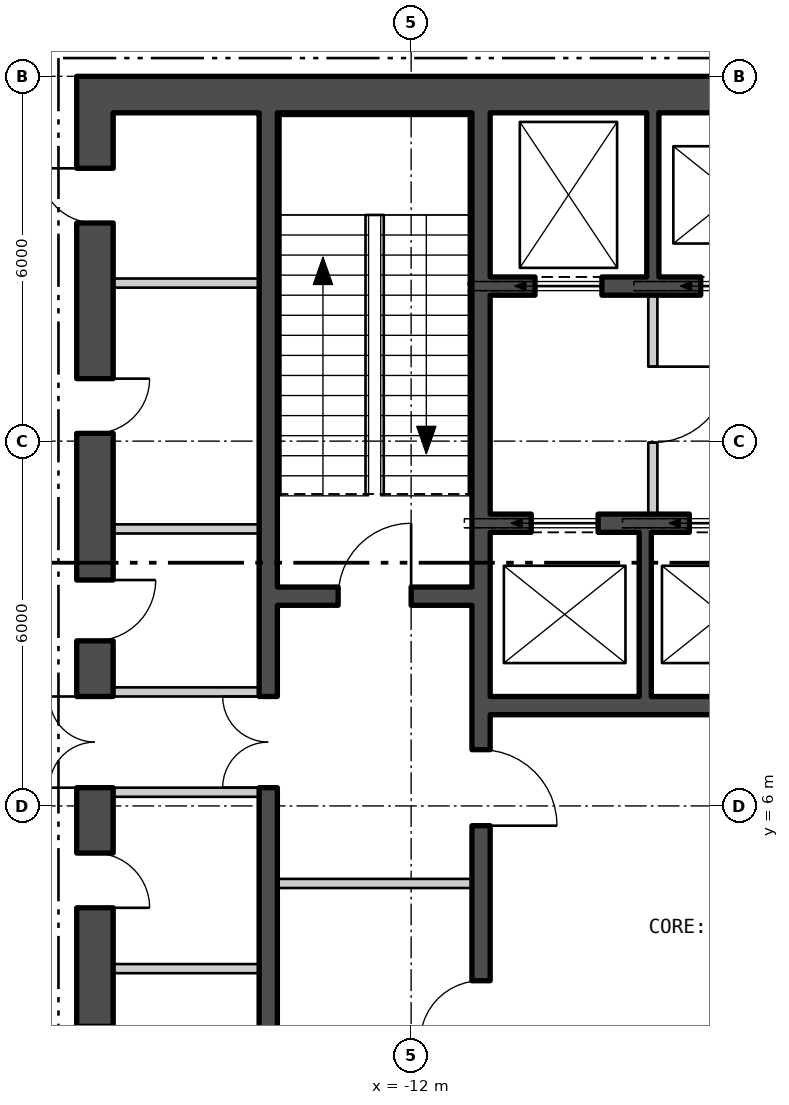
"""IFC4 building model, lengths in metres.
Left out: names, types, materials, properties, quantities, classifications, styles, units other than length and angle.
Written with IfcOpenShell. Run it as: python <this file> out.ifc"""

import sys

from ifc_helpers import new_model, si_unit, direction, frame, frame_2d, origin, place, context, subcontext, project, spatial, polyline, rectangle, outline, extrude, element, fill, save


model = new_model("IFC4")
c1 = context("Model", 3, precision=1e-05, world=origin(), true_north=direction((0.0, 1.0)))
c2 = subcontext(c1, "Body", "Model", "MODEL_VIEW")
j1 = project(units=[si_unit("LENGTHUNIT", "METRE"), si_unit("PLANEANGLEUNIT", "RADIAN")], contexts=[c1])
p1 = place(None, origin())
s1 = spatial("IfcSite", under=j1, at=p1, CompositionType="ELEMENT")
p2 = place(p1, origin())
s2 = spatial("IfcBuilding", under=s1, at=p2, CompositionType="ELEMENT")
p3 = place(p2, frame((0.0, 0.0, 33.3)))
s3 = spatial("IfcBuildingStorey", under=s2, at=p3, CompositionType="ELEMENT", Elevation=33.3)
p4 = place(p3, frame((-28.625, 10.015, -0.18), z_axis=(0.0, 0.0, 1.0), x_axis=(0.500000335318, -0.866025210188, 0.0)))
e1 = element("IfcWall", 1, at=p4, inside=s3, PredefinedType="SOLIDWALL", context=c2, shape_type="SweptSolid", body=[
    extrude(outline(polyline([(-0.13, -0.225), (45.88, -0.225), (45.62, 0.225), (0.13, 0.225), (-0.13, -0.225)])), origin(), (0.0, 0.0, 1.0), 4.28),
])
p5 = place(p4, frame((1.425, 0.0, 1.08)))
e2 = element("IfcOpeningElement", 2, at=p5, cuts=e1, PredefinedType="OPENING", context=c2, shape_type="SweptSolid", body=[
    extrude(rectangle(XDim=2.4, YDim=2.6, at=frame_2d((1.2, 1.3))), frame((0.0, 0.235, 0.0), z_axis=(0.0, -1.0, 0.0), x_axis=(1.0, 0.0, 0.0)), (0.0, 0.0, 1.0), 0.47),
])
p6 = place(p4, frame((5.895, 0.0, 1.08)))
e3 = element("IfcOpeningElement", 3, at=p6, cuts=e1, PredefinedType="OPENING", context=c2, shape_type="SweptSolid", body=[
    extrude(rectangle(XDim=2.4, YDim=2.6, at=frame_2d((1.2, 1.3))), frame((0.0, 0.235, 0.0), z_axis=(0.0, -1.0, 0.0), x_axis=(1.0, 0.0, 0.0)), (0.0, 0.0, 1.0), 0.47),
])
p7 = place(p4, frame((10.403, 0.0, 1.08)))
e4 = element("IfcOpeningElement", 4, at=p7, cuts=e1, PredefinedType="OPENING", context=c2, shape_type="SweptSolid", body=[
    extrude(rectangle(XDim=2.4, YDim=2.6, at=frame_2d((1.2, 1.3))), frame((0.0, 0.235, 0.0), z_axis=(0.0, -1.0, 0.0), x_axis=(1.0, 0.0, 0.0)), (0.0, 0.0, 1.0), 0.47),
])
p8 = place(p4, frame((14.912, 0.0, 1.08)))
e5 = element("IfcOpeningElement", 5, at=p8, cuts=e1, PredefinedType="OPENING", context=c2, shape_type="SweptSolid", body=[
    extrude(rectangle(XDim=2.4, YDim=2.6, at=frame_2d((1.2, 1.3))), frame((0.0, 0.235, 0.0), z_axis=(0.0, -1.0, 0.0), x_axis=(1.0, 0.0, 0.0)), (0.0, 0.0, 1.0), 0.47),
])
p9 = place(p4, frame((19.421, 0.0, 1.08)))
e6 = element("IfcOpeningElement", 6, at=p9, cuts=e1, PredefinedType="OPENING", context=c2, shape_type="SweptSolid", body=[
    extrude(rectangle(XDim=2.4, YDim=2.6, at=frame_2d((1.2, 1.3))), frame((0.0, 0.235, 0.0), z_axis=(0.0, -1.0, 0.0), x_axis=(1.0, 0.0, 0.0)), (0.0, 0.0, 1.0), 0.47),
])
p10 = place(p4, frame((23.929, 0.0, 1.08)))
e7 = element("IfcOpeningElement", 7, at=p10, cuts=e1, PredefinedType="OPENING", context=c2, shape_type="SweptSolid", body=[
    extrude(rectangle(XDim=2.4, YDim=2.6, at=frame_2d((1.2, 1.3))), frame((0.0, 0.235, 0.0), z_axis=(0.0, -1.0, 0.0), x_axis=(1.0, 0.0, 0.0)), (0.0, 0.0, 1.0), 0.47),
])
p11 = place(p4, frame((28.438, 0.0, 1.08)))
e8 = element("IfcOpeningElement", 8, at=p11, cuts=e1, PredefinedType="OPENING", context=c2, shape_type="SweptSolid", body=[
    extrude(rectangle(XDim=2.4, YDim=2.6, at=frame_2d((1.2, 1.3))), frame((0.0, 0.235, 0.0), z_axis=(0.0, -1.0, 0.0), x_axis=(1.0, 0.0, 0.0)), (0.0, 0.0, 1.0), 0.47),
])
p12 = place(p4, frame((32.947, 0.0, 1.08)))
e9 = element("IfcOpeningElement", 9, at=p12, cuts=e1, PredefinedType="OPENING", context=c2, shape_type="SweptSolid", body=[
    extrude(rectangle(XDim=2.4, YDim=2.6, at=frame_2d((1.2, 1.3))), frame((0.0, 0.235, 0.0), z_axis=(0.0, -1.0, 0.0), x_axis=(1.0, 0.0, 0.0)), (0.0, 0.0, 1.0), 0.47),
])
p13 = place(p4, frame((37.455, 0.0, 1.08)))
e10 = element("IfcOpeningElement", 10, at=p13, cuts=e1, PredefinedType="OPENING", context=c2, shape_type="SweptSolid", body=[
    extrude(rectangle(XDim=2.4, YDim=2.6, at=frame_2d((1.2, 1.3))), frame((0.0, 0.235, 0.0), z_axis=(0.0, -1.0, 0.0), x_axis=(1.0, 0.0, 0.0)), (0.0, 0.0, 1.0), 0.47),
])
p14 = place(p4, frame((41.925, 0.0, 1.08)))
e11 = element("IfcOpeningElement", 11, at=p14, cuts=e1, PredefinedType="OPENING", context=c2, shape_type="SweptSolid", body=[
    extrude(rectangle(XDim=2.4, YDim=2.6, at=frame_2d((1.2, 1.3))), frame((0.0, 0.235, 0.0), z_axis=(0.0, -1.0, 0.0), x_axis=(1.0, 0.0, 0.0)), (0.0, 0.0, 1.0), 0.47),
])
p15 = place(p3, frame((-17.5, 17.7, 0.0), z_axis=(0.0, 0.0, 1.0), x_axis=(1.0, 0.0, 0.0)))
e12 = element("IfcWall", 12, at=p15, inside=s3, PredefinedType="SHEAR", context=c2, shape_type="SweptSolid", body=[
    extrude(rectangle(XDim=35.0, YDim=0.6, at=frame_2d((17.5, 0.0))), origin(), (0.0, 0.0, 1.0), 4.3),
])
p16 = place(p3, frame((-17.2, 0.6, 0.0), z_axis=(0.0, 0.0, 1.0), x_axis=(0.0, 1.0, 0.0)))
e13 = element("IfcWall", 13, at=p16, inside=s3, PredefinedType="SHEAR", context=c2, shape_type="SweptSolid", body=[
    extrude(rectangle(XDim=16.8, YDim=0.6, at=frame_2d((8.4, 0.0))), origin(), (0.0, 0.0, 1.0), 4.3),
])
p17 = place(p16, frame((5.7, 0.0, 0.0)))
e14 = element("IfcOpeningElement", 14, at=p17, cuts=e13, PredefinedType="OPENING", context=c2, shape_type="SweptSolid", body=[
    extrude(rectangle(XDim=1.5, YDim=2.1, at=frame_2d((0.75, 1.05))), frame((0.0, 0.31, 0.0), z_axis=(0.0, -1.0, 0.0), x_axis=(1.0, 0.0, 0.0)), (0.0, 0.0, 1.0), 0.62),
])
p18 = place(p16, frame((0.875, 0.0, 0.0)))
e15 = element("IfcOpeningElement", 15, at=p18, cuts=e13, PredefinedType="OPENING", context=c2, shape_type="SweptSolid", body=[
    extrude(rectangle(XDim=0.9, YDim=2.1, at=frame_2d((0.45, 1.05))), frame((0.0, 0.31, 0.0), z_axis=(0.0, -1.0, 0.0), x_axis=(1.0, 0.0, 0.0)), (0.0, 0.0, 1.0), 0.62),
])
p19 = place(p16, frame((3.724, 0.0, 0.0)))
e16 = element("IfcOpeningElement", 16, at=p19, cuts=e13, PredefinedType="OPENING", context=c2, shape_type="SweptSolid", body=[
    extrude(rectangle(XDim=0.9, YDim=2.1, at=frame_2d((0.45, 1.05))), frame((0.0, 0.31, 0.0), z_axis=(0.0, -1.0, 0.0), x_axis=(1.0, 0.0, 0.0)), (0.0, 0.0, 1.0), 0.62),
])
p20 = place(p16, frame((8.115, 0.0, 0.0)))
e17 = element("IfcOpeningElement", 17, at=p20, cuts=e13, PredefinedType="OPENING", context=c2, shape_type="SweptSolid", body=[
    extrude(rectangle(XDim=1.0, YDim=2.1, at=frame_2d((0.5, 1.05))), frame((0.0, 0.31, 0.0), z_axis=(0.0, -1.0, 0.0), x_axis=(1.0, 0.0, 0.0)), (0.0, 0.0, 1.0), 0.62),
])
p21 = place(p16, frame((11.528, 0.0, 0.0)))
e18 = element("IfcOpeningElement", 18, at=p21, cuts=e13, PredefinedType="OPENING", context=c2, shape_type="SweptSolid", body=[
    extrude(rectangle(XDim=0.9, YDim=2.1, at=frame_2d((0.45, 1.05))), frame((0.0, 0.31, 0.0), z_axis=(0.0, -1.0, 0.0), x_axis=(1.0, 0.0, 0.0)), (0.0, 0.0, 1.0), 0.62),
])
p22 = place(p16, frame((14.987, 0.0, 0.0)))
e19 = element("IfcOpeningElement", 19, at=p22, cuts=e13, PredefinedType="OPENING", context=c2, shape_type="SweptSolid", body=[
    extrude(rectangle(XDim=0.9, YDim=2.1, at=frame_2d((0.45, 1.05))), frame((0.0, 0.31, 0.0), z_axis=(0.0, -1.0, 0.0), x_axis=(1.0, 0.0, 0.0)), (0.0, 0.0, 1.0), 0.62),
])
p23 = place(p3, frame((-10.85, 0.6, 0.0), z_axis=(0.0, 0.0, 1.0), x_axis=(0.0, 1.0, 0.0)))
e20 = element("IfcWall", 20, at=p23, inside=s3, PredefinedType="SHEAR", context=c2, shape_type="SweptSolid", body=[
    extrude(rectangle(XDim=16.8, YDim=0.3, at=frame_2d((8.4, 0.0))), origin(), (0.0, 0.0, 1.0), 4.3),
])
p24 = place(p23, frame((5.075, 0.0, 0.0)))
e21 = element("IfcOpeningElement", 21, at=p24, cuts=e20, PredefinedType="OPENING", context=c2, shape_type="SweptSolid", body=[
    extrude(rectangle(XDim=1.25, YDim=2.1, at=frame_2d((0.625, 1.05))), frame((0.0, 0.16, 0.0), z_axis=(0.0, -1.0, 0.0), x_axis=(1.0, 0.0, 0.0)), (0.0, 0.0, 1.0), 0.32),
])
p25 = place(p23, frame((1.525, 0.0, 0.0)))
e22 = element("IfcOpeningElement", 22, at=p25, cuts=e20, PredefinedType="OPENING", context=c2, shape_type="SweptSolid", body=[
    extrude(rectangle(XDim=1.0, YDim=2.1, at=frame_2d((0.5, 1.05))), frame((0.0, 0.16, 0.0), z_axis=(0.0, -1.0, 0.0), x_axis=(1.0, 0.0, 0.0)), (0.0, 0.0, 1.0), 0.32),
])
p26 = place(p3, frame((-14.35, 0.6, 0.0), z_axis=(0.0, 0.0, 1.0), x_axis=(0.0, 1.0, 0.0)))
e23 = element("IfcWall", 23, at=p26, inside=s3, PredefinedType="SHEAR", context=c2, shape_type="SweptSolid", body=[
    extrude(rectangle(XDim=16.8, YDim=0.3, at=frame_2d((8.4, 0.0))), origin(), (0.0, 0.0, 1.0), 4.3),
])
p27 = place(p26, frame((5.7, 0.0, 0.0)))
e24 = element("IfcOpeningElement", 24, at=p27, cuts=e23, PredefinedType="OPENING", context=c2, shape_type="SweptSolid", body=[
    extrude(rectangle(XDim=1.5, YDim=2.1, at=frame_2d((0.75, 1.05))), frame((0.0, 0.16, 0.0), z_axis=(0.0, -1.0, 0.0), x_axis=(1.0, 0.0, 0.0)), (0.0, 0.0, 1.0), 0.32),
])
p28 = place(p3, frame((-14.2, 9.45, 0.0), z_axis=(0.0, 0.0, 1.0), x_axis=(1.0, 0.0, 0.0)))
e25 = element("IfcWall", 25, at=p28, inside=s3, PredefinedType="SHEAR", context=c2, shape_type="SweptSolid", body=[
    extrude(rectangle(XDim=3.2, YDim=0.3, at=frame_2d((1.6, 0.0))), origin(), (0.0, 0.0, 1.0), 4.3),
])
p29 = place(p28, frame((1.0, 0.0, 0.0)))
e26 = element("IfcOpeningElement", 26, at=p29, cuts=e25, PredefinedType="OPENING", context=c2, shape_type="SweptSolid", body=[
    extrude(rectangle(XDim=1.2, YDim=2.1, at=frame_2d((0.6, 1.05))), frame((0.0, 0.16, 0.0), z_axis=(0.0, -1.0, 0.0), x_axis=(1.0, 0.0, 0.0)), (0.0, 0.0, 1.0), 0.32),
])
p30 = place(p3, frame((-10.7, 14.55, 0.0), z_axis=(0.0, 0.0, 1.0), x_axis=(1.0, 0.0, 0.0)))
e27 = element("IfcWall", 27, at=p30, inside=s3, PredefinedType="SHEAR", context=c2, shape_type="SweptSolid", body=[
    extrude(rectangle(XDim=21.4, YDim=0.3, at=frame_2d((10.7, 0.0))), origin(), (0.0, 0.0, 1.0), 4.3),
])
p31 = place(p30, frame((0.738, 0.0, 0.0)))
e28 = element("IfcOpeningElement", 28, at=p31, cuts=e27, PredefinedType="OPENING", context=c2, shape_type="SweptSolid", body=[
    extrude(rectangle(XDim=1.1, YDim=2.1, at=frame_2d((0.55, 1.05))), frame((0.0, 0.16, 0.0), z_axis=(0.0, -1.0, 0.0), x_axis=(1.0, 0.0, 0.0)), (0.0, 0.0, 1.0), 0.32),
])
p32 = place(p30, frame((3.462, 0.0, 0.0)))
e29 = element("IfcOpeningElement", 29, at=p32, cuts=e27, PredefinedType="OPENING", context=c2, shape_type="SweptSolid", body=[
    extrude(rectangle(XDim=1.1, YDim=2.1, at=frame_2d((0.55, 1.05))), frame((0.0, 0.16, 0.0), z_axis=(0.0, -1.0, 0.0), x_axis=(1.0, 0.0, 0.0)), (0.0, 0.0, 1.0), 0.32),
])
p33 = place(p30, frame((6.138, 0.0, 0.0)))
e30 = element("IfcOpeningElement", 30, at=p33, cuts=e27, PredefinedType="OPENING", context=c2, shape_type="SweptSolid", body=[
    extrude(rectangle(XDim=1.1, YDim=2.1, at=frame_2d((0.55, 1.05))), frame((0.0, 0.16, 0.0), z_axis=(0.0, -1.0, 0.0), x_axis=(1.0, 0.0, 0.0)), (0.0, 0.0, 1.0), 0.32),
])
p34 = place(p30, frame((8.812, 0.0, 0.0)))
e31 = element("IfcOpeningElement", 31, at=p34, cuts=e27, PredefinedType="OPENING", context=c2, shape_type="SweptSolid", body=[
    extrude(rectangle(XDim=1.1, YDim=2.1, at=frame_2d((0.55, 1.05))), frame((0.0, 0.16, 0.0), z_axis=(0.0, -1.0, 0.0), x_axis=(1.0, 0.0, 0.0)), (0.0, 0.0, 1.0), 0.32),
])
p35 = place(p30, frame((14.162, 0.0, 0.0)))
e32 = element("IfcOpeningElement", 32, at=p35, cuts=e27, PredefinedType="OPENING", context=c2, shape_type="SweptSolid", body=[
    extrude(rectangle(XDim=1.1, YDim=2.1, at=frame_2d((0.55, 1.05))), frame((0.0, 0.16, 0.0), z_axis=(0.0, -1.0, 0.0), x_axis=(1.0, 0.0, 0.0)), (0.0, 0.0, 1.0), 0.32),
])
p36 = place(p30, frame((16.837, 0.0, 0.0)))
e33 = element("IfcOpeningElement", 33, at=p36, cuts=e27, PredefinedType="OPENING", context=c2, shape_type="SweptSolid", body=[
    extrude(rectangle(XDim=1.1, YDim=2.1, at=frame_2d((0.55, 1.05))), frame((0.0, 0.16, 0.0), z_axis=(0.0, -1.0, 0.0), x_axis=(1.0, 0.0, 0.0)), (0.0, 0.0, 1.0), 0.32),
])
p37 = place(p30, frame((19.562, 0.0, 0.0)))
e34 = element("IfcOpeningElement", 34, at=p37, cuts=e27, PredefinedType="OPENING", context=c2, shape_type="SweptSolid", body=[
    extrude(rectangle(XDim=1.1, YDim=2.1, at=frame_2d((0.55, 1.05))), frame((0.0, 0.16, 0.0), z_axis=(0.0, -1.0, 0.0), x_axis=(1.0, 0.0, 0.0)), (0.0, 0.0, 1.0), 0.32),
])
p38 = place(p3, frame((-10.7, 10.65, 0.0), z_axis=(0.0, 0.0, 1.0), x_axis=(1.0, 0.0, 0.0)))
e35 = element("IfcWall", 35, at=p38, inside=s3, PredefinedType="SHEAR", context=c2, shape_type="SweptSolid", body=[
    extrude(rectangle(XDim=10.3, YDim=0.3, at=frame_2d((5.15, 0.0))), origin(), (0.0, 0.0, 1.0), 4.3),
])
p39 = place(p38, frame((0.675, 0.0, 0.0)))
e36 = element("IfcOpeningElement", 36, at=p39, cuts=e35, PredefinedType="OPENING", context=c2, shape_type="SweptSolid", body=[
    extrude(rectangle(XDim=1.1, YDim=2.1, at=frame_2d((0.55, 1.05))), frame((0.0, 0.16, 0.0), z_axis=(0.0, -1.0, 0.0), x_axis=(1.0, 0.0, 0.0)), (0.0, 0.0, 1.0), 0.32),
])
p40 = place(p38, frame((3.275, 0.0, 0.0)))
e37 = element("IfcOpeningElement", 37, at=p40, cuts=e35, PredefinedType="OPENING", context=c2, shape_type="SweptSolid", body=[
    extrude(rectangle(XDim=1.1, YDim=2.1, at=frame_2d((0.55, 1.05))), frame((0.0, 0.16, 0.0), z_axis=(0.0, -1.0, 0.0), x_axis=(1.0, 0.0, 0.0)), (0.0, 0.0, 1.0), 0.32),
])
p41 = place(p38, frame((5.825, 0.0, 0.0)))
e38 = element("IfcOpeningElement", 38, at=p41, cuts=e35, PredefinedType="OPENING", context=c2, shape_type="SweptSolid", body=[
    extrude(rectangle(XDim=1.1, YDim=2.1, at=frame_2d((0.55, 1.05))), frame((0.0, 0.16, 0.0), z_axis=(0.0, -1.0, 0.0), x_axis=(1.0, 0.0, 0.0)), (0.0, 0.0, 1.0), 0.32),
])
p42 = place(p38, frame((8.375, 0.0, 0.0)))
e39 = element("IfcOpeningElement", 39, at=p42, cuts=e35, PredefinedType="OPENING", context=c2, shape_type="SweptSolid", body=[
    extrude(rectangle(XDim=1.1, YDim=2.1, at=frame_2d((0.55, 1.05))), frame((0.0, 0.16, 0.0), z_axis=(0.0, -1.0, 0.0), x_axis=(1.0, 0.0, 0.0)), (0.0, 0.0, 1.0), 0.32),
])
p43 = place(p3, frame((-10.7, 7.65, 0.0), z_axis=(0.0, 0.0, 1.0), x_axis=(1.0, 0.0, 0.0)))
e40 = element("IfcWall", 40, at=p43, inside=s3, PredefinedType="SHEAR", context=c2, shape_type="SweptSolid", body=[
    extrude(rectangle(XDim=10.3, YDim=0.3, at=frame_2d((5.15, 0.0))), origin(), (0.0, 0.0, 1.0), 4.3),
])
for number, where, z_axis, x_axis in (
    (41, (-8.025, 14.7, 0.0), (0.0, 0.0, 1.0), (0.0, 1.0, 0.0)),
    (42, (-8.15, 7.8, 0.0), (0.0, 0.0, 1.0), (0.0, 1.0, 0.0)),
):
    element("IfcWall", number, at=place(p3, frame(where, z_axis=z_axis, x_axis=x_axis)), inside=s3, PredefinedType="SHEAR", context=c2, shape_type="SweptSolid", body=[
        extrude(rectangle(XDim=2.7, YDim=0.2, at=frame_2d((1.35, 0.0))), origin(), (0.0, 0.0, 1.0), 4.3),
    ])
p44 = place(p3, frame((-8.025, 10.8, 0.0), z_axis=(0.0, 0.0, 1.0), x_axis=(0.0, 1.0, 0.0)))
e43 = element("IfcWall", 43, at=p44, inside=s3, PredefinedType="PARTITIONING", context=c2, shape_type="SweptSolid", body=[
    extrude(rectangle(XDim=3.6, YDim=0.15, at=frame_2d((1.8, 0.0))), origin(), (0.0, 0.0, 1.0), 4.3),
])
p45 = place(p44, frame((1.175, 0.0, 0.0)))
e44 = element("IfcOpeningElement", 44, at=p45, cuts=e43, PredefinedType="OPENING", context=c2, shape_type="SweptSolid", body=[
    extrude(rectangle(XDim=1.25, YDim=2.1, at=frame_2d((0.625, 1.05))), frame((0.0, 0.085, 0.0), z_axis=(0.0, -1.0, 0.0), x_axis=(1.0, 0.0, 0.0)), (0.0, 0.0, 1.0), 0.17),
])
p46 = place(p3, frame((-14.2, 4.725, 0.0), z_axis=(0.0, 0.0, 1.0), x_axis=(1.0, 0.0, 0.0)))
e45 = element("IfcWall", 45, at=p46, inside=s3, PredefinedType="PARTITIONING", context=c2, shape_type="SweptSolid", body=[
    extrude(rectangle(XDim=3.2, YDim=0.15, at=frame_2d((1.6, 0.0))), origin(), (0.0, 0.0, 1.0), 4.3),
])
for number, where, z_axis, x_axis in (
    (46, (-16.9, 6.225, 0.0), (0.0, 0.0, 1.0), (1.0, 0.0, 0.0)),
    (47, (-16.9, 7.875, 0.0), (0.0, 0.0, 1.0), (1.0, 0.0, 0.0)),
    (48, (-16.9, 3.324, 0.0), (0.0, 0.0, 1.0), (1.0, 0.0, 0.0)),
    (49, (-16.9, 10.556, 0.0), (0.0, 0.0, 1.0), (1.0, 0.0, 0.0)),
    (50, (-16.9, 14.6, 0.0), (0.0, 0.0, 1.0), (1.0, 0.0, 0.0)),
):
    element("IfcWall", number, at=place(p3, frame(where, z_axis=z_axis, x_axis=x_axis)), inside=s3, PredefinedType="PARTITIONING", context=c2, shape_type="SweptSolid", body=[
        extrude(rectangle(XDim=2.4, YDim=0.15, at=frame_2d((1.2, 0.0))), origin(), (0.0, 0.0, 1.0), 4.3),
    ])
p47 = place(p31, origin())
e51 = element("IfcDoor", 51, at=p47, inside=s3, OperationType="SLIDING_TO_LEFT", PredefinedType="DOOR", context=c2, shape_type="SweptSolid", body=[
    extrude(rectangle(XDim=1.1, YDim=2.1, at=frame_2d((0.55, 1.05))), frame((0.0, 0.025, 0.0), z_axis=(0.0, -1.0, 0.0), x_axis=(1.0, 0.0, 0.0)), (0.0, 0.0, 1.0), 0.05),
])
fill(e28, e51)
p48 = place(p32, origin())
e52 = element("IfcDoor", 52, at=p48, inside=s3, OperationType="SLIDING_TO_LEFT", PredefinedType="DOOR", context=c2, shape_type="SweptSolid", body=[
    extrude(rectangle(XDim=1.1, YDim=2.1, at=frame_2d((0.55, 1.05))), frame((0.0, 0.025, 0.0), z_axis=(0.0, -1.0, 0.0), x_axis=(1.0, 0.0, 0.0)), (0.0, 0.0, 1.0), 0.05),
])
fill(e29, e52)
p49 = place(p39, origin())
e53 = element("IfcDoor", 53, at=p49, inside=s3, OperationType="SLIDING_TO_LEFT", PredefinedType="DOOR", context=c2, shape_type="SweptSolid", body=[
    extrude(rectangle(XDim=1.1, YDim=2.1, at=frame_2d((0.55, 1.05))), frame((0.0, 0.025, 0.0), z_axis=(0.0, -1.0, 0.0), x_axis=(1.0, 0.0, 0.0)), (0.0, 0.0, 1.0), 0.05),
])
fill(e36, e53)
p50 = place(p40, origin())
e54 = element("IfcDoor", 54, at=p50, inside=s3, OperationType="SLIDING_TO_LEFT", PredefinedType="DOOR", context=c2, shape_type="SweptSolid", body=[
    extrude(rectangle(XDim=1.1, YDim=2.1, at=frame_2d((0.55, 1.05))), frame((0.0, 0.025, 0.0), z_axis=(0.0, -1.0, 0.0), x_axis=(1.0, 0.0, 0.0)), (0.0, 0.0, 1.0), 0.05),
])
fill(e37, e54)
p51 = place(p45, origin())
e55 = element("IfcDoor", 55, at=p51, inside=s3, OperationType="SINGLE_SWING_RIGHT", PredefinedType="DOOR", context=c2, shape_type="SweptSolid", body=[
    extrude(rectangle(XDim=1.25, YDim=2.1, at=frame_2d((0.625, 1.05))), frame((0.0, 0.025, 0.0), z_axis=(0.0, -1.0, 0.0), x_axis=(1.0, 0.0, 0.0)), (0.0, 0.0, 1.0), 0.05),
])
fill(e44, e55)
p52 = place(p29, origin())
e56 = element("IfcDoor", 56, at=p52, inside=s3, OperationType="SINGLE_SWING_LEFT", PredefinedType="DOOR", context=c2, shape_type="SweptSolid", body=[
    extrude(rectangle(XDim=1.2, YDim=2.1, at=frame_2d((0.6, 1.05))), frame((0.0, 0.025, 0.0), z_axis=(0.0, -1.0, 0.0), x_axis=(1.0, 0.0, 0.0)), (0.0, 0.0, 1.0), 0.05),
])
fill(e26, e56)
p53 = place(p24, origin())
e57 = element("IfcDoor", 57, at=p53, inside=s3, OperationType="SINGLE_SWING_LEFT", PredefinedType="DOOR", context=c2, shape_type="SweptSolid", body=[
    extrude(rectangle(XDim=1.25, YDim=2.1, at=frame_2d((0.625, 1.05))), frame((0.0, 0.025, 0.0), z_axis=(0.0, -1.0, 0.0), x_axis=(1.0, 0.0, 0.0)), (0.0, 0.0, 1.0), 0.05),
])
fill(e21, e57)
p54 = place(p25, origin())
e58 = element("IfcDoor", 58, at=p54, inside=s3, OperationType="SINGLE_SWING_RIGHT", PredefinedType="DOOR", context=c2, shape_type="SweptSolid", body=[
    extrude(rectangle(XDim=1.0, YDim=2.1, at=frame_2d((0.5, 1.05))), frame((0.0, 0.025, 0.0), z_axis=(0.0, -1.0, 0.0), x_axis=(1.0, 0.0, 0.0)), (0.0, 0.0, 1.0), 0.05),
])
fill(e22, e58)
p55 = place(p27, origin())
e59 = element("IfcDoor", 59, at=p55, inside=s3, OperationType="DOUBLE_DOOR_SINGLE_SWING", PredefinedType="DOOR", context=c2, shape_type="SweptSolid", body=[
    extrude(rectangle(XDim=1.5, YDim=2.1, at=frame_2d((0.75, 1.05))), frame((0.0, 0.025, 0.0), z_axis=(0.0, -1.0, 0.0), x_axis=(1.0, 0.0, 0.0)), (0.0, 0.0, 1.0), 0.05),
])
fill(e24, e59)
p56 = place(p17, origin())
e60 = element("IfcDoor", 60, at=p56, inside=s3, OperationType="DOUBLE_DOOR_SINGLE_SWING", PredefinedType="DOOR", context=c2, shape_type="SweptSolid", body=[
    extrude(rectangle(XDim=1.5, YDim=2.1, at=frame_2d((0.75, 1.05))), frame((0.0, 0.025, 0.0), z_axis=(0.0, -1.0, 0.0), x_axis=(1.0, 0.0, 0.0)), (0.0, 0.0, 1.0), 0.05),
])
fill(e14, e60)
p57 = place(p19, origin())
e61 = element("IfcDoor", 61, at=p57, inside=s3, OperationType="SINGLE_SWING_LEFT", PredefinedType="DOOR", context=c2, shape_type="SweptSolid", body=[
    extrude(rectangle(XDim=0.9, YDim=2.1, at=frame_2d((0.45, 1.05))), frame((0.0, 0.025, 0.0), z_axis=(0.0, -1.0, 0.0), x_axis=(1.0, 0.0, 0.0)), (0.0, 0.0, 1.0), 0.05),
])
fill(e16, e61)
p58 = place(p20, origin())
e62 = element("IfcDoor", 62, at=p58, inside=s3, OperationType="SINGLE_SWING_RIGHT", PredefinedType="DOOR", context=c2, shape_type="SweptSolid", body=[
    extrude(rectangle(XDim=1.0, YDim=2.1, at=frame_2d((0.5, 1.05))), frame((0.0, 0.025, 0.0), z_axis=(0.0, -1.0, 0.0), x_axis=(1.0, 0.0, 0.0)), (0.0, 0.0, 1.0), 0.05),
])
fill(e17, e62)
p59 = place(p21, origin())
e63 = element("IfcDoor", 63, at=p59, inside=s3, OperationType="SINGLE_SWING_RIGHT", PredefinedType="DOOR", context=c2, shape_type="SweptSolid", body=[
    extrude(rectangle(XDim=0.9, YDim=2.1, at=frame_2d((0.45, 1.05))), frame((0.0, 0.025, 0.0), z_axis=(0.0, -1.0, 0.0), x_axis=(1.0, 0.0, 0.0)), (0.0, 0.0, 1.0), 0.05),
])
fill(e18, e63)
p60 = place(p22, origin())
e64 = element("IfcDoor", 64, at=p60, inside=s3, OperationType="SINGLE_SWING_LEFT", PredefinedType="DOOR", context=c2, shape_type="SweptSolid", body=[
    extrude(rectangle(XDim=0.9, YDim=2.1, at=frame_2d((0.45, 1.05))), frame((0.0, 0.025, 0.0), z_axis=(0.0, -1.0, 0.0), x_axis=(1.0, 0.0, 0.0)), (0.0, 0.0, 1.0), 0.05),
])
fill(e19, e64)
save(model, sys.argv[1])
